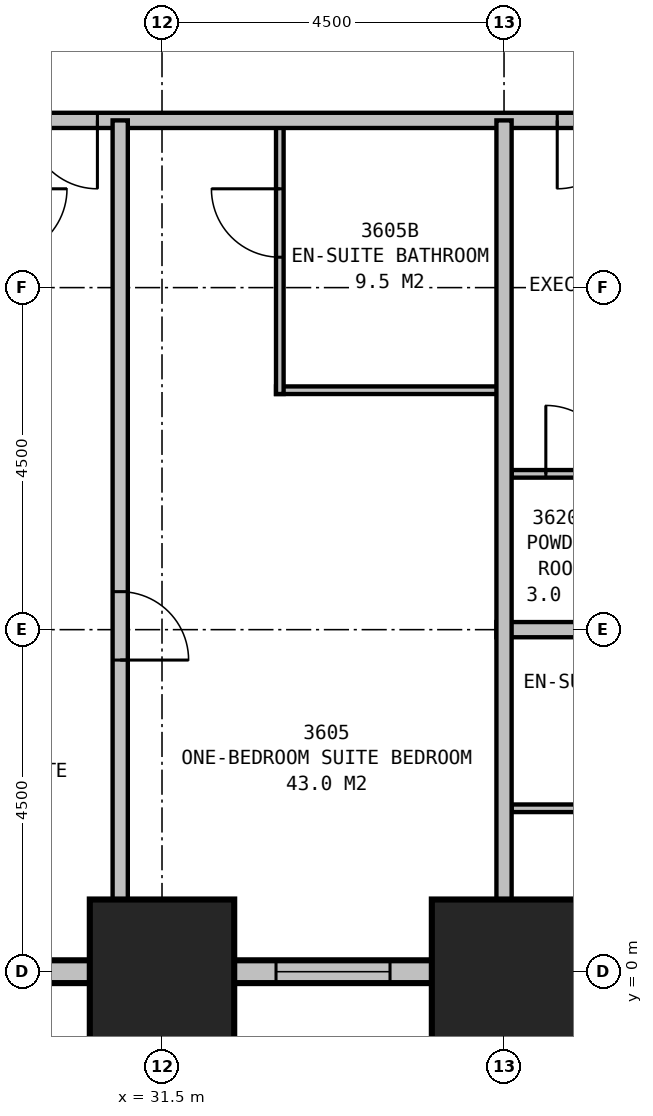
"""IFC4 building model, lengths in metres.
Left out: names, types, materials, properties, quantities, classifications, styles, units other than length and angle.
Written with IfcOpenShell. Run it as: python <this file> out.ifc"""

import sys

from ifc_helpers import new_model, si_unit, direction, frame, frame_2d, origin, origin_2d, place, context, subcontext, project, spatial, rectangle, extrude, element, fill, save


model = new_model("IFC4")
c1 = context("Model", 3, precision=1e-05, world=origin(), true_north=direction((0.0, 1.0)))
c2 = subcontext(c1, "Body", "Model", "MODEL_VIEW")
j1 = project(units=[si_unit("LENGTHUNIT", "METRE"), si_unit("PLANEANGLEUNIT", "RADIAN")], contexts=[c1])
p1 = place(None, origin())
s1 = spatial("IfcSite", under=j1, at=p1, CompositionType="ELEMENT")
p2 = place(p1, origin())
s2 = spatial("IfcBuilding", under=s1, at=p2, CompositionType="ELEMENT")
p3 = place(p2, frame((0.0, 0.0, 138.9)))
s3 = spatial("IfcBuildingStorey", under=s2, at=p3, CompositionType="ELEMENT", Elevation=138.9)
for number, where, z_axis, x_axis in (
    (1, (31.5, 0.0, 0.0), (0.0, 0.0, 1.0), (1.0, 0.0, 0.0)),
    (2, (36.0, 0.0, 0.0), (0.0, 0.0, 1.0), (1.0, 0.0, 0.0)),
):
    element("IfcColumn", number, at=place(p3, frame(where, z_axis=z_axis, x_axis=x_axis)), inside=s3, PredefinedType="COLUMN", context=c2, shape_type="SweptSolid", body=[
        extrude(rectangle(XDim=1.9, YDim=1.9, at=origin_2d()), origin(), (0.0, 0.0, 1.0), 3.5),
    ])
p4 = place(p3, frame((4.35, 0.0, 0.0), z_axis=(0.0, 0.0, 1.0), x_axis=(1.0, 0.0, 0.0)))
e3 = element("IfcWall", 3, at=p4, inside=s3, PredefinedType="STANDARD", context=c2, shape_type="SweptSolid", body=[
    extrude(rectangle(XDim=40.8, YDim=0.3, at=frame_2d((20.4, 0.0))), origin(), (0.0, 0.0, 1.0), 2.15),
])
p5 = place(p4, frame((1.65, 0.0, 0.5)))
e4 = element("IfcOpeningElement", 4, at=p5, cuts=e3, PredefinedType="OPENING", context=c2, shape_type="SweptSolid", body=[
    extrude(rectangle(XDim=1.5, YDim=1.5, at=frame_2d((0.75, 0.75))), frame((0.0, 0.16, 0.0), z_axis=(0.0, -1.0, 0.0), x_axis=(1.0, 0.0, 0.0)), (0.0, 0.0, 1.0), 0.32),
])
p6 = place(p4, frame((6.15, 0.0, 0.5)))
e5 = element("IfcOpeningElement", 5, at=p6, cuts=e3, PredefinedType="OPENING", context=c2, shape_type="SweptSolid", body=[
    extrude(rectangle(XDim=1.5, YDim=1.5, at=frame_2d((0.75, 0.75))), frame((0.0, 0.16, 0.0), z_axis=(0.0, -1.0, 0.0), x_axis=(1.0, 0.0, 0.0)), (0.0, 0.0, 1.0), 0.32),
])
p7 = place(p4, frame((10.65, 0.0, 0.5)))
e6 = element("IfcOpeningElement", 6, at=p7, cuts=e3, PredefinedType="OPENING", context=c2, shape_type="SweptSolid", body=[
    extrude(rectangle(XDim=1.5, YDim=1.5, at=frame_2d((0.75, 0.75))), frame((0.0, 0.16, 0.0), z_axis=(0.0, -1.0, 0.0), x_axis=(1.0, 0.0, 0.0)), (0.0, 0.0, 1.0), 0.32),
])
p8 = place(p4, frame((15.15, 0.0, 0.5)))
e7 = element("IfcOpeningElement", 7, at=p8, cuts=e3, PredefinedType="OPENING", context=c2, shape_type="SweptSolid", body=[
    extrude(rectangle(XDim=1.5, YDim=1.5, at=frame_2d((0.75, 0.75))), frame((0.0, 0.16, 0.0), z_axis=(0.0, -1.0, 0.0), x_axis=(1.0, 0.0, 0.0)), (0.0, 0.0, 1.0), 0.32),
])
p9 = place(p4, frame((19.65, 0.0, 0.5)))
e8 = element("IfcOpeningElement", 8, at=p9, cuts=e3, PredefinedType="OPENING", context=c2, shape_type="SweptSolid", body=[
    extrude(rectangle(XDim=1.5, YDim=1.5, at=frame_2d((0.75, 0.75))), frame((0.0, 0.16, 0.0), z_axis=(0.0, -1.0, 0.0), x_axis=(1.0, 0.0, 0.0)), (0.0, 0.0, 1.0), 0.32),
])
p10 = place(p4, frame((24.15, 0.0, 0.5)))
e9 = element("IfcOpeningElement", 9, at=p10, cuts=e3, PredefinedType="OPENING", context=c2, shape_type="SweptSolid", body=[
    extrude(rectangle(XDim=1.5, YDim=1.5, at=frame_2d((0.75, 0.75))), frame((0.0, 0.16, 0.0), z_axis=(0.0, -1.0, 0.0), x_axis=(1.0, 0.0, 0.0)), (0.0, 0.0, 1.0), 0.32),
])
p11 = place(p4, frame((28.65, 0.0, 0.5)))
e10 = element("IfcOpeningElement", 10, at=p11, cuts=e3, PredefinedType="OPENING", context=c2, shape_type="SweptSolid", body=[
    extrude(rectangle(XDim=1.5, YDim=1.5, at=frame_2d((0.75, 0.75))), frame((0.0, 0.16, 0.0), z_axis=(0.0, -1.0, 0.0), x_axis=(1.0, 0.0, 0.0)), (0.0, 0.0, 1.0), 0.32),
])
p12 = place(p4, frame((33.15, 0.0, 0.5)))
e11 = element("IfcOpeningElement", 11, at=p12, cuts=e3, PredefinedType="OPENING", context=c2, shape_type="SweptSolid", body=[
    extrude(rectangle(XDim=1.5, YDim=1.5, at=frame_2d((0.75, 0.75))), frame((0.0, 0.16, 0.0), z_axis=(0.0, -1.0, 0.0), x_axis=(1.0, 0.0, 0.0)), (0.0, 0.0, 1.0), 0.32),
])
p13 = place(p4, frame((37.65, 0.0, 0.5)))
e12 = element("IfcOpeningElement", 12, at=p13, cuts=e3, PredefinedType="OPENING", context=c2, shape_type="SweptSolid", body=[
    extrude(rectangle(XDim=1.5, YDim=1.5, at=frame_2d((0.75, 0.75))), frame((0.0, 0.16, 0.0), z_axis=(0.0, -1.0, 0.0), x_axis=(1.0, 0.0, 0.0)), (0.0, 0.0, 1.0), 0.32),
])
p14 = place(p3, frame((11.2, 11.2, 0.0), z_axis=(0.0, 0.0, 1.0), x_axis=(1.0, 0.0, 0.0)))
e13 = element("IfcWall", 13, at=p14, inside=s3, PredefinedType="PARTITIONING", context=c2, shape_type="SweptSolid", body=[
    extrude(rectangle(XDim=27.1, YDim=0.2, at=frame_2d((13.55, 0.0))), origin(), (0.0, 0.0, 1.0), 3.25),
])
p15 = place(p14, frame((4.05, 0.0, 0.0), z_axis=(0.0, 0.0, 1.0), x_axis=(-1.0, 0.0, 0.0)))
e14 = element("IfcOpeningElement", 14, at=p15, cuts=e13, PredefinedType="OPENING", context=c2, shape_type="SweptSolid", body=[
    extrude(rectangle(XDim=0.9, YDim=2.1, at=frame_2d((0.45, 1.05))), frame((0.0, 0.11, 0.0), z_axis=(0.0, -1.0, 0.0), x_axis=(1.0, 0.0, 0.0)), (0.0, 0.0, 1.0), 0.22),
])
p16 = place(p14, frame((12.65, 0.0, 0.0), z_axis=(0.0, 0.0, 1.0), x_axis=(-1.0, 0.0, 0.0)))
e15 = element("IfcOpeningElement", 15, at=p16, cuts=e13, PredefinedType="OPENING", context=c2, shape_type="SweptSolid", body=[
    extrude(rectangle(XDim=1.0, YDim=2.1, at=frame_2d((0.5, 1.05))), frame((0.0, 0.11, 0.0), z_axis=(0.0, -1.0, 0.0), x_axis=(1.0, 0.0, 0.0)), (0.0, 0.0, 1.0), 0.22),
])
p17 = place(p14, frame((19.45, 0.0, 0.0), z_axis=(0.0, 0.0, 1.0), x_axis=(-1.0, 0.0, 0.0)))
e16 = element("IfcOpeningElement", 16, at=p17, cuts=e13, PredefinedType="OPENING", context=c2, shape_type="SweptSolid", body=[
    extrude(rectangle(XDim=0.9, YDim=2.1, at=frame_2d((0.45, 1.05))), frame((0.0, 0.11, 0.0), z_axis=(0.0, -1.0, 0.0), x_axis=(1.0, 0.0, 0.0)), (0.0, 0.0, 1.0), 0.22),
])
p18 = place(p14, frame((1.6, 0.0, 0.0), z_axis=(0.0, 0.0, 1.0), x_axis=(-1.0, 0.0, 0.0)))
e17 = element("IfcOpeningElement", 17, at=p18, cuts=e13, PredefinedType="OPENING", context=c2, shape_type="SweptSolid", body=[
    extrude(rectangle(XDim=0.9, YDim=2.1, at=frame_2d((0.45, 1.05))), frame((0.0, 0.11, 0.0), z_axis=(0.0, -1.0, 0.0), x_axis=(1.0, 0.0, 0.0)), (0.0, 0.0, 1.0), 0.22),
])
p19 = place(p14, frame((26.4, 0.0, 0.0), z_axis=(0.0, 0.0, 1.0), x_axis=(-1.0, 0.0, 0.0)))
e18 = element("IfcOpeningElement", 18, at=p19, cuts=e13, PredefinedType="OPENING", context=c2, shape_type="SweptSolid", body=[
    extrude(rectangle(XDim=0.9, YDim=2.1, at=frame_2d((0.45, 1.05))), frame((0.0, 0.11, 0.0), z_axis=(0.0, -1.0, 0.0), x_axis=(1.0, 0.0, 0.0)), (0.0, 0.0, 1.0), 0.22),
])
p20 = place(p3, frame((30.95, 11.2, 0.0), z_axis=(0.0, 0.0, 1.0), x_axis=(0.0, -1.0, 0.0)))
e19 = element("IfcWall", 19, at=p20, inside=s3, PredefinedType="PARTITIONING", context=c2, shape_type="SweptSolid", body=[
    extrude(rectangle(XDim=11.2, YDim=0.2, at=frame_2d((5.6, 0.0))), origin(), (0.0, 0.0, 1.0), 2.25),
])
p21 = place(p20, frame((6.2, 0.0, 0.0)))
e20 = element("IfcOpeningElement", 20, at=p21, cuts=e19, PredefinedType="OPENING", context=c2, shape_type="SweptSolid", body=[
    extrude(rectangle(XDim=0.9, YDim=2.1, at=frame_2d((0.45, 1.05))), frame((0.0, 0.11, 0.0), z_axis=(0.0, -1.0, 0.0), x_axis=(1.0, 0.0, 0.0)), (0.0, 0.0, 1.0), 0.22),
])
p22 = place(p3, frame((33.0, 7.65, 0.0), z_axis=(0.0, 0.0, 1.0), x_axis=(1.0, 0.0, 0.0)))
e21 = element("IfcWall", 21, at=p22, inside=s3, PredefinedType="PLUMBINGWALL", context=c2, shape_type="SweptSolid", body=[
    extrude(rectangle(XDim=3.0, YDim=0.1, at=frame_2d((1.5, 0.0))), origin(), (0.0, 0.0, 1.0), 3.25),
])
p23 = place(p3, frame((33.05, 11.2, 0.0), z_axis=(0.0, 0.0, 1.0), x_axis=(0.0, -1.0, 0.0)))
e22 = element("IfcWall", 22, at=p23, inside=s3, PredefinedType="PLUMBINGWALL", context=c2, shape_type="SweptSolid", body=[
    extrude(rectangle(XDim=3.6, YDim=0.1, at=frame_2d((1.8, 0.0))), origin(), (0.0, 0.0, 1.0), 3.25),
])
p24 = place(p23, frame((1.8, 0.0, 0.0), z_axis=(0.0, 0.0, 1.0), x_axis=(-1.0, 0.0, 0.0)))
e23 = element("IfcOpeningElement", 23, at=p24, cuts=e22, PredefinedType="OPENING", context=c2, shape_type="SweptSolid", body=[
    extrude(rectangle(XDim=0.9, YDim=2.1, at=frame_2d((0.45, 1.05))), frame((0.0, 0.06, 0.0), z_axis=(0.0, -1.0, 0.0), x_axis=(1.0, 0.0, 0.0)), (0.0, 0.0, 1.0), 0.12),
])
p25 = place(p3, frame((36.0, 11.2, 0.0), z_axis=(0.0, 0.0, 1.0), x_axis=(0.0, -1.0, 0.0)))
e24 = element("IfcWall", 24, at=p25, inside=s3, PredefinedType="PARTITIONING", context=c2, shape_type="SweptSolid", body=[
    extrude(rectangle(XDim=11.2, YDim=0.2, at=frame_2d((5.6, 0.0))), origin(), (0.0, 0.0, 1.0), 2.25),
])
p26 = place(p3, frame((35.9, 4.5, 0.0), z_axis=(0.0, 0.0, 1.0), x_axis=(1.0, 0.0, 0.0)))
e25 = element("IfcWall", 25, at=p26, inside=s3, PredefinedType="PARTITIONING", context=c2, shape_type="SweptSolid", body=[
    extrude(rectangle(XDim=9.1, YDim=0.2, at=frame_2d((4.55, 0.0))), origin(), (0.0, 0.0, 1.0), 3.25),
])
p27 = place(p26, frame((7.1, 0.0, 0.0)))
e26 = element("IfcOpeningElement", 26, at=p27, cuts=e25, PredefinedType="OPENING", context=c2, shape_type="SweptSolid", body=[
    extrude(rectangle(XDim=0.9, YDim=2.1, at=frame_2d((0.45, 1.05))), frame((0.0, 0.11, 0.0), z_axis=(0.0, -1.0, 0.0), x_axis=(1.0, 0.0, 0.0)), (0.0, 0.0, 1.0), 0.22),
])
p28 = place(p3, frame((36.1, 6.55, 0.0), z_axis=(0.0, 0.0, 1.0), x_axis=(1.0, 0.0, 0.0)))
e27 = element("IfcWall", 27, at=p28, inside=s3, PredefinedType="PLUMBINGWALL", context=c2, shape_type="SweptSolid", body=[
    extrude(rectangle(XDim=1.8, YDim=0.1, at=frame_2d((0.9, 0.0))), origin(), (0.0, 0.0, 1.0), 3.25),
])
p29 = place(p28, frame((0.45, 0.0, 0.0)))
e28 = element("IfcOpeningElement", 28, at=p29, cuts=e27, PredefinedType="OPENING", context=c2, shape_type="SweptSolid", body=[
    extrude(rectangle(XDim=0.9, YDim=2.1, at=frame_2d((0.45, 1.05))), frame((0.0, 0.06, 0.0), z_axis=(0.0, -1.0, 0.0), x_axis=(1.0, 0.0, 0.0)), (0.0, 0.0, 1.0), 0.12),
])
p30 = place(p3, frame((36.1, 2.15, 0.0), z_axis=(0.0, 0.0, 1.0), x_axis=(1.0, 0.0, 0.0)))
e29 = element("IfcWall", 29, at=p30, inside=s3, PredefinedType="PLUMBINGWALL", context=c2, shape_type="SweptSolid", body=[
    extrude(rectangle(XDim=3.5, YDim=0.1, at=frame_2d((1.75, 0.0))), origin(), (0.0, 0.0, 1.0), 3.25),
])
p31 = place(p30, frame((1.8, 0.0, 0.0), z_axis=(0.0, 0.0, 1.0), x_axis=(-1.0, 0.0, 0.0)))
e30 = element("IfcOpeningElement", 30, at=p31, cuts=e29, PredefinedType="OPENING", context=c2, shape_type="SweptSolid", body=[
    extrude(rectangle(XDim=0.9, YDim=2.1, at=frame_2d((0.45, 1.05))), frame((0.0, 0.06, 0.0), z_axis=(0.0, -1.0, 0.0), x_axis=(1.0, 0.0, 0.0)), (0.0, 0.0, 1.0), 0.12),
])
p32 = place(p11, origin())
e31 = element("IfcWindow", 31, at=p32, inside=s3, PartitioningType="SINGLE_PANEL", PredefinedType="WINDOW", context=c2, shape_type="SweptSolid", body=[
    extrude(rectangle(XDim=1.5, YDim=1.5, at=frame_2d((0.75, 0.75))), frame((0.0, 0.03, 0.0), z_axis=(0.0, -1.0, 0.0), x_axis=(1.0, 0.0, 0.0)), (0.0, 0.0, 1.0), 0.06),
])
fill(e10, e31)
p33 = place(p17, origin())
e32 = element("IfcDoor", 32, at=p33, inside=s3, OperationType="SINGLE_SWING_LEFT", PredefinedType="DOOR", context=c2, shape_type="SweptSolid", body=[
    extrude(rectangle(XDim=0.9, YDim=2.1, at=frame_2d((0.45, 1.05))), frame((0.0, 0.025, 0.0), z_axis=(0.0, -1.0, 0.0), x_axis=(1.0, 0.0, 0.0)), (0.0, 0.0, 1.0), 0.05),
])
fill(e16, e32)
p34 = place(p19, origin())
e33 = element("IfcDoor", 33, at=p34, inside=s3, OperationType="SINGLE_SWING_RIGHT", PredefinedType="DOOR", context=c2, shape_type="SweptSolid", body=[
    extrude(rectangle(XDim=0.9, YDim=2.1, at=frame_2d((0.45, 1.05))), frame((0.0, 0.025, 0.0), z_axis=(0.0, -1.0, 0.0), x_axis=(1.0, 0.0, 0.0)), (0.0, 0.0, 1.0), 0.05),
])
fill(e18, e33)
p35 = place(p21, origin())
e34 = element("IfcDoor", 34, at=p35, inside=s3, OperationType="SINGLE_SWING_RIGHT", PredefinedType="DOOR", context=c2, shape_type="SweptSolid", body=[
    extrude(rectangle(XDim=0.9, YDim=2.1, at=frame_2d((0.45, 1.05))), frame((0.0, 0.025, 0.0), z_axis=(0.0, -1.0, 0.0), x_axis=(1.0, 0.0, 0.0)), (0.0, 0.0, 1.0), 0.05),
])
fill(e20, e34)
p36 = place(p24, origin())
e35 = element("IfcDoor", 35, at=p36, inside=s3, OperationType="SINGLE_SWING_RIGHT", PredefinedType="DOOR", context=c2, shape_type="SweptSolid", body=[
    extrude(rectangle(XDim=0.9, YDim=2.1, at=frame_2d((0.45, 1.05))), frame((0.0, 0.025, 0.0), z_axis=(0.0, -1.0, 0.0), x_axis=(1.0, 0.0, 0.0)), (0.0, 0.0, 1.0), 0.05),
])
fill(e23, e35)
p37 = place(p29, origin())
e36 = element("IfcDoor", 36, at=p37, inside=s3, OperationType="SINGLE_SWING_LEFT", PredefinedType="DOOR", context=c2, shape_type="SweptSolid", body=[
    extrude(rectangle(XDim=0.9, YDim=2.1, at=frame_2d((0.45, 1.05))), frame((0.0, 0.025, 0.0), z_axis=(0.0, -1.0, 0.0), x_axis=(1.0, 0.0, 0.0)), (0.0, 0.0, 1.0), 0.05),
])
fill(e28, e36)
save(model, sys.argv[1])
